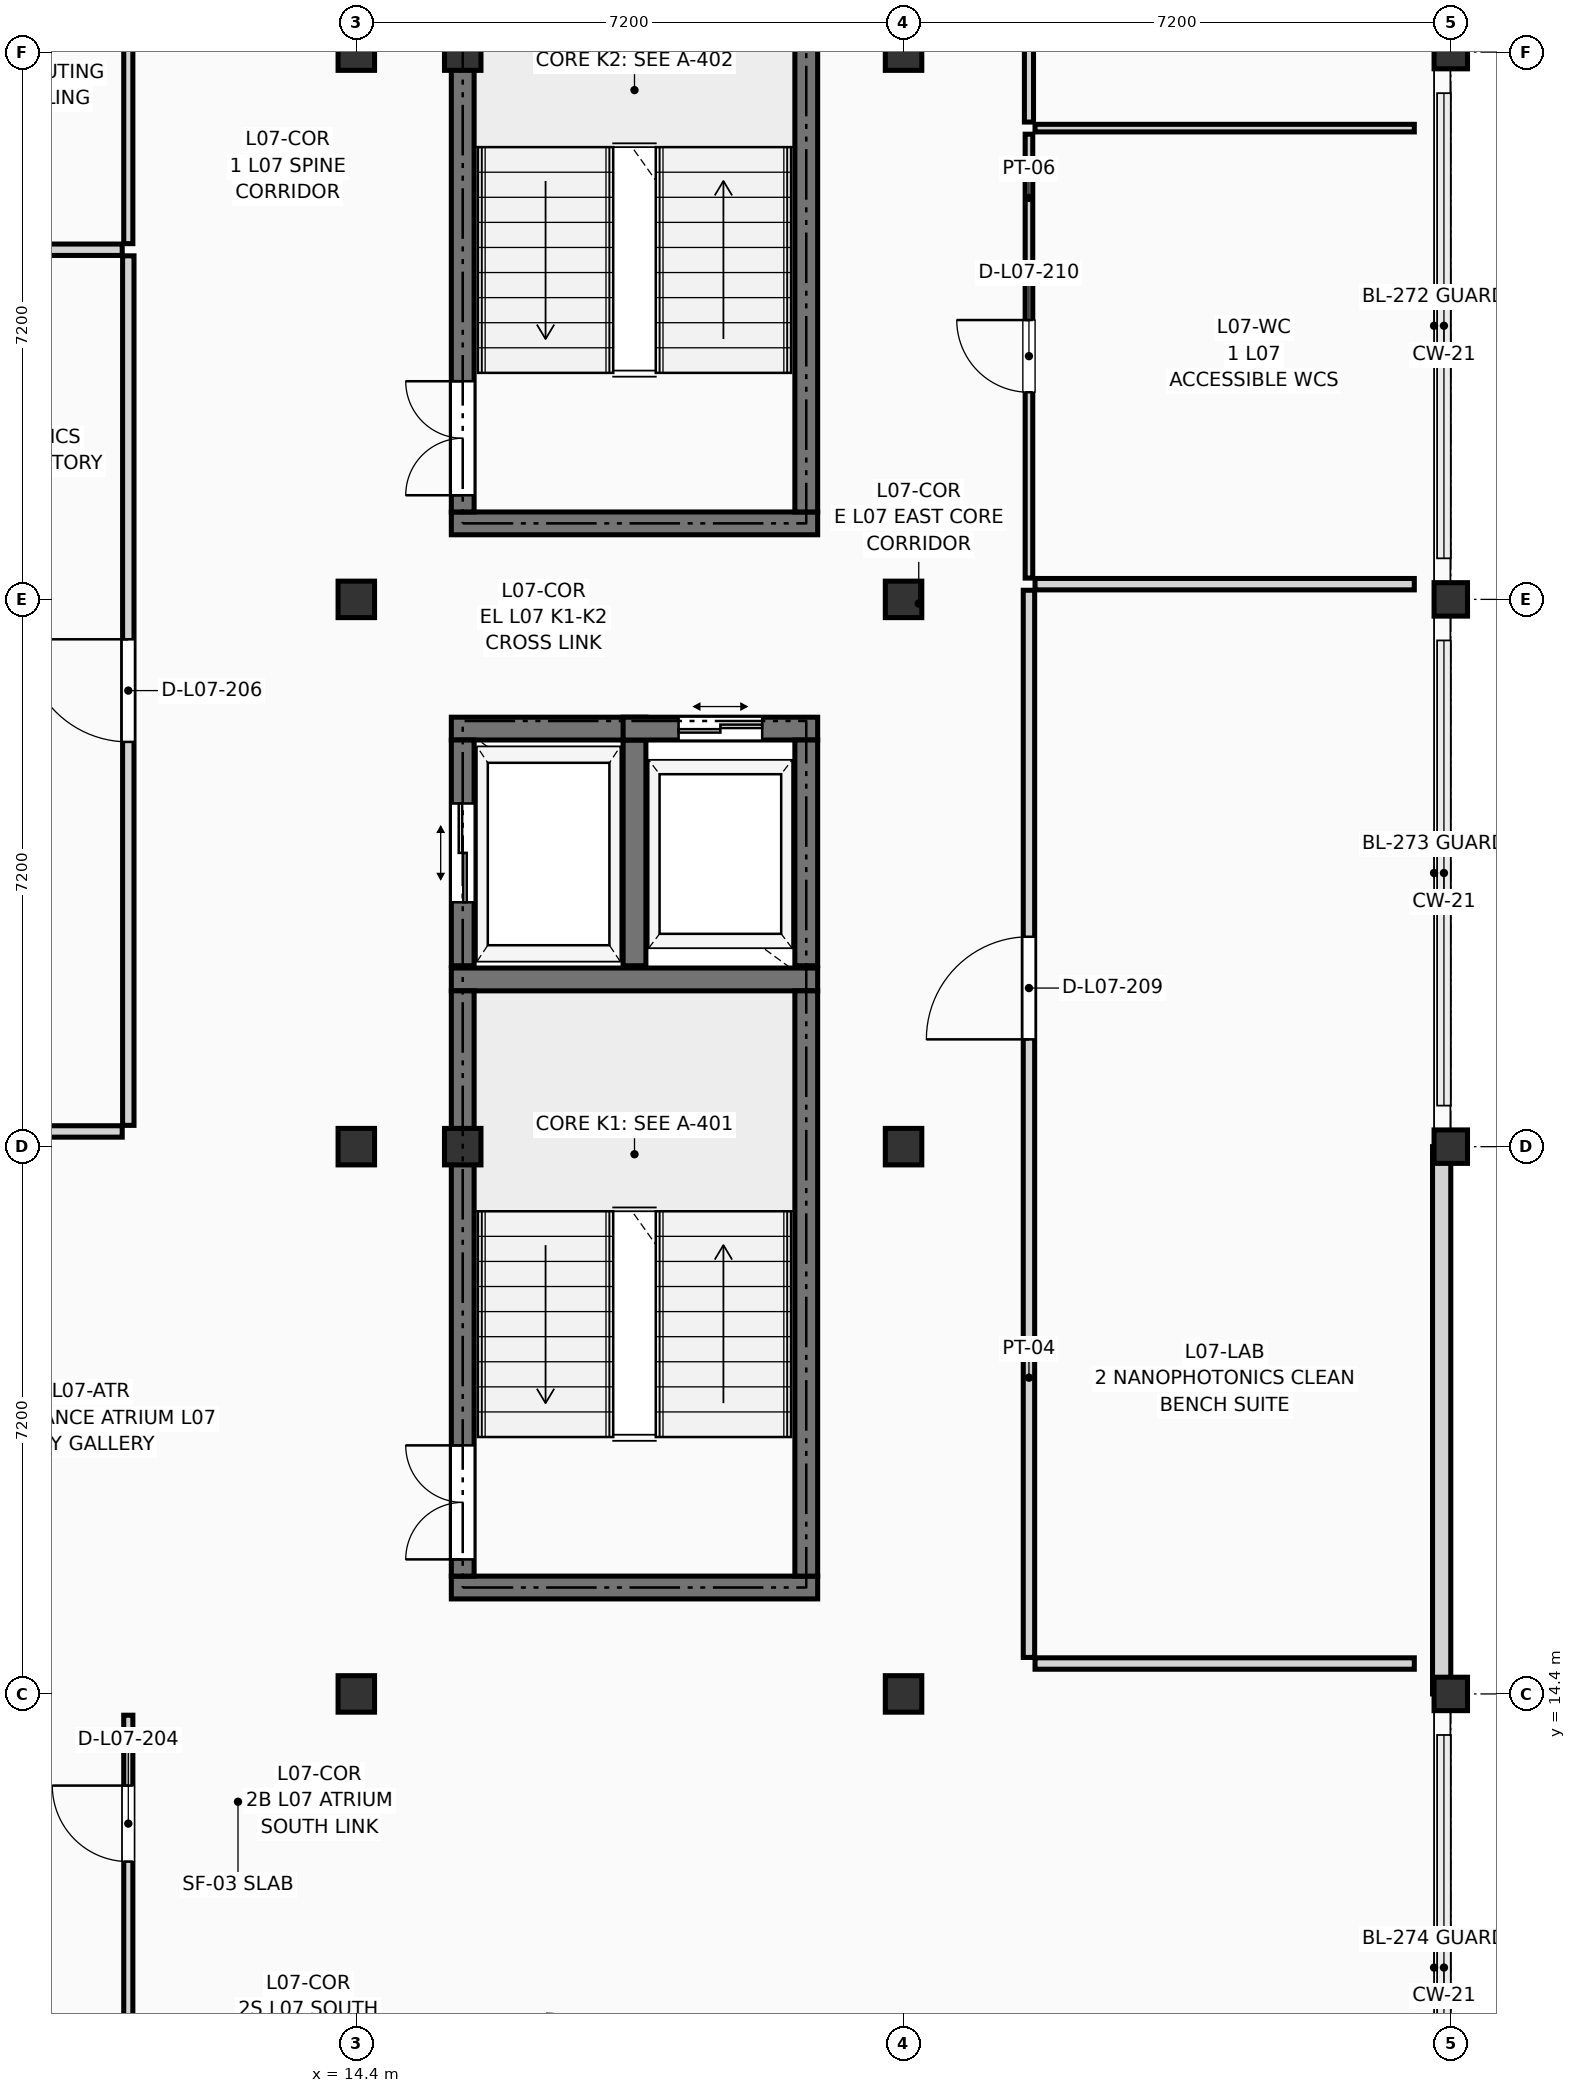
"""IFC4 building model, lengths in metres.
Left out: names, types, materials, properties, quantities, classifications, styles, units other than length and angle.
Written with IfcOpenShell. Run it as: python <this file> out.ifc"""

import sys

from ifc_helpers import new_model, si_unit, direction, frame, frame_2d, origin, origin_2d, place, context, subcontext, project, spatial, rectangle, extrude, element, fill, save


model = new_model("IFC4")
c1 = context("Model", 3, precision=1e-05, world=origin(), true_north=direction((0.0, 1.0)))
c2 = subcontext(c1, "Body", "Model", "MODEL_VIEW")
j1 = project(units=[si_unit("LENGTHUNIT", "METRE"), si_unit("PLANEANGLEUNIT", "RADIAN")], contexts=[c1])
p1 = place(None, origin())
s1 = spatial("IfcSite", under=j1, at=p1, CompositionType="ELEMENT")
p2 = place(p1, origin())
s2 = spatial("IfcBuilding", under=s1, at=p2, CompositionType="ELEMENT")
p3 = place(p2, frame((0.0, 0.0, 26.25)))
s3 = spatial("IfcBuildingStorey", under=s2, at=p3, CompositionType="ELEMENT", Elevation=26.25)
for number, where, z_axis, x_axis in (
    (1, (14.4, 14.4, 0.0), (0.0, 0.0, 1.0), (1.0, 0.0, 0.0)),
    (2, (14.4, 21.6, 0.0), (0.0, 0.0, 1.0), (1.0, 0.0, 0.0)),
    (3, (14.4, 28.8, 0.0), (0.0, 0.0, 1.0), (1.0, 0.0, 0.0)),
    (4, (14.4, 36.0, 0.0), (0.0, 0.0, 1.0), (1.0, 0.0, 0.0)),
    (5, (15.8, 21.6, 0.0), (0.0, 0.0, 1.0), (1.0, 0.0, 0.0)),
    (6, (15.8, 36.0, 0.0), (0.0, 0.0, 1.0), (1.0, 0.0, 0.0)),
    (7, (21.6, 14.4, 0.0), (0.0, 0.0, 1.0), (1.0, 0.0, 0.0)),
    (8, (21.6, 21.6, 0.0), (0.0, 0.0, 1.0), (1.0, 0.0, 0.0)),
    (9, (21.6, 28.8, 0.0), (0.0, 0.0, 1.0), (1.0, 0.0, 0.0)),
    (10, (21.6, 36.0, 0.0), (0.0, 0.0, 1.0), (1.0, 0.0, 0.0)),
):
    element("IfcColumn", number, at=place(p3, frame(where, z_axis=z_axis, x_axis=x_axis)), inside=s3, PredefinedType="COLUMN", context=c2, shape_type="SweptSolid", body=[
        extrude(rectangle(XDim=0.48, YDim=0.48, at=origin_2d()), origin(), (0.0, 0.0, 1.0), 3.45),
    ])
for number, where, z_axis, x_axis in (
    (11, (28.8, 14.4, 0.0), (0.0, 0.0, 1.0), (1.0, 0.0, 0.0)),
    (12, (28.8, 21.6, 0.0), (0.0, 0.0, 1.0), (1.0, 0.0, 0.0)),
    (13, (28.8, 28.8, 0.0), (0.0, 0.0, 1.0), (1.0, 0.0, 0.0)),
    (14, (28.8, 36.0, 0.0), (0.0, 0.0, 1.0), (1.0, 0.0, 0.0)),
):
    element("IfcColumn", number, at=place(p3, frame(where, z_axis=z_axis, x_axis=x_axis)), inside=s3, PredefinedType="COLUMN", context=c2, shape_type="SweptSolid", body=[
        extrude(rectangle(XDim=0.44, YDim=0.44, at=origin_2d()), origin(), (0.0, 0.0, 1.0), 3.45),
    ])
p4 = place(p3, frame((28.68, 14.4, 0.0), z_axis=(0.0, 0.0, 1.0), x_axis=(0.0, 1.0, 0.0)))
e15 = element("IfcWall", 15, at=p4, inside=s3, PredefinedType="SOLIDWALL", context=c2, shape_type="SweptSolid", body=[
    extrude(rectangle(XDim=7.2, YDim=0.24, at=frame_2d((3.6, 0.0))), origin(), (0.0, 0.0, 1.0), 2.69),
])
for number, where, z_axis, x_axis in (
    (16, (15.65, 15.8, 0.0), (0.0, 0.0, 1.0), (1.0, 0.0, 0.0)),
    (17, (15.65, 23.8, 0.0), (0.0, 0.0, 1.0), (1.0, 0.0, 0.0)),
):
    element("IfcWall", number, at=place(p3, frame(where, z_axis=z_axis, x_axis=x_axis)), inside=s3, PredefinedType="SHEAR", context=c2, shape_type="SweptSolid", body=[
        extrude(rectangle(XDim=4.82, YDim=0.3, at=frame_2d((2.41, 0.0))), origin(), (0.0, 0.0, 1.0), 3.24),
    ])
p5 = place(p3, frame((15.8, 15.95, 0.0), z_axis=(0.0, 0.0, 1.0), x_axis=(0.0, 1.0, 0.0)))
e18 = element("IfcWall", 18, at=p5, inside=s3, PredefinedType="SHEAR", context=c2, shape_type="SweptSolid", body=[
    extrude(rectangle(XDim=7.7, YDim=0.3, at=frame_2d((3.85, 0.0))), origin(), (0.0, 0.0, 1.0), 3.24),
])
p6 = place(p5, frame((0.22, 0.0, 0.0)))
e19 = element("IfcOpeningElement", 19, at=p6, cuts=e18, PredefinedType="OPENING", context=c2, shape_type="SweptSolid", body=[
    extrude(rectangle(XDim=1.5, YDim=2.2, at=frame_2d((0.75, 1.1))), frame((0.0, 0.162, 0.0), z_axis=(0.0, -1.0, 0.0), x_axis=(1.0, 0.0, 0.0)), (0.0, 0.0, 1.0), 0.324),
])
p7 = place(p3, frame((20.32, 15.95, 0.0), z_axis=(0.0, 0.0, 1.0), x_axis=(0.0, 1.0, 0.0)))
e20 = element("IfcWall", 20, at=p7, inside=s3, PredefinedType="SHEAR", context=c2, shape_type="SweptSolid", body=[
    extrude(rectangle(XDim=7.7, YDim=0.3, at=frame_2d((3.85, 0.0))), origin(), (0.0, 0.0, 1.0), 3.24),
])
p8 = place(p3, frame((15.65, 29.8, 0.0), z_axis=(0.0, 0.0, 1.0), x_axis=(1.0, 0.0, 0.0)))
e21 = element("IfcWall", 21, at=p8, inside=s3, PredefinedType="SHEAR", context=c2, shape_type="SweptSolid", body=[
    extrude(rectangle(XDim=4.82, YDim=0.3, at=frame_2d((2.41, 0.0))), origin(), (0.0, 0.0, 1.0), 3.24),
])
p9 = place(p3, frame((15.8, 29.95, 0.0), z_axis=(0.0, 0.0, 1.0), x_axis=(0.0, 1.0, 0.0)))
e22 = element("IfcWall", 22, at=p9, inside=s3, PredefinedType="SHEAR", context=c2, shape_type="SweptSolid", body=[
    extrude(rectangle(XDim=7.7, YDim=0.3, at=frame_2d((3.85, 0.0))), origin(), (0.0, 0.0, 1.0), 3.24),
])
p10 = place(p9, frame((0.22, 0.0, 0.0)))
e23 = element("IfcOpeningElement", 23, at=p10, cuts=e22, PredefinedType="OPENING", context=c2, shape_type="SweptSolid", body=[
    extrude(rectangle(XDim=1.5, YDim=2.2, at=frame_2d((0.75, 1.1))), frame((0.0, 0.162, 0.0), z_axis=(0.0, -1.0, 0.0), x_axis=(1.0, 0.0, 0.0)), (0.0, 0.0, 1.0), 0.324),
])
p11 = place(p3, frame((20.32, 29.95, 0.0), z_axis=(0.0, 0.0, 1.0), x_axis=(0.0, 1.0, 0.0)))
e24 = element("IfcWall", 24, at=p11, inside=s3, PredefinedType="SHEAR", context=c2, shape_type="SweptSolid", body=[
    extrude(rectangle(XDim=7.7, YDim=0.3, at=frame_2d((3.85, 0.0))), origin(), (0.0, 0.0, 1.0), 3.24),
])
p12 = place(p3, frame((15.65, 27.1, 0.0), z_axis=(0.0, 0.0, 1.0), x_axis=(1.0, 0.0, 0.0)))
e25 = element("IfcWall", 25, at=p12, inside=s3, PredefinedType="SHEAR", context=c2, shape_type="SweptSolid", body=[
    extrude(rectangle(XDim=2.56, YDim=0.3, at=frame_2d((1.28, 0.0))), origin(), (0.0, 0.0, 1.0), 3.24),
])
p13 = place(p3, frame((15.8, 23.98, 0.0), z_axis=(0.0, 0.0, 1.0), x_axis=(0.0, 1.0, 0.0)))
e26 = element("IfcWall", 26, at=p13, inside=s3, PredefinedType="SHEAR", context=c2, shape_type="SweptSolid", body=[
    extrude(rectangle(XDim=2.97, YDim=0.3, at=frame_2d((1.485, 0.0))), origin(), (0.0, 0.0, 1.0), 3.24),
])
p14 = place(p13, frame((0.835, 0.0, 0.0)))
e27 = element("IfcOpeningElement", 27, at=p14, cuts=e26, PredefinedType="OPENING", context=c2, shape_type="SweptSolid", body=[
    extrude(rectangle(XDim=1.3, YDim=2.25, at=frame_2d((0.65, 1.125))), frame((0.0, 0.162, 0.0), z_axis=(0.0, -1.0, 0.0), x_axis=(1.0, 0.0, 0.0)), (0.0, 0.0, 1.0), 0.324),
])
p15 = place(p3, frame((18.06, 23.98, 0.0), z_axis=(0.0, 0.0, 1.0), x_axis=(0.0, 1.0, 0.0)))
e28 = element("IfcWall", 28, at=p15, inside=s3, PredefinedType="SHEAR", context=c2, shape_type="SweptSolid", body=[
    extrude(rectangle(XDim=2.97, YDim=0.3, at=frame_2d((1.485, 0.0))), origin(), (0.0, 0.0, 1.0), 3.24),
])
p16 = place(p3, frame((17.91, 27.1, 0.0), z_axis=(0.0, 0.0, 1.0), x_axis=(1.0, 0.0, 0.0)))
e29 = element("IfcWall", 29, at=p16, inside=s3, PredefinedType="SHEAR", context=c2, shape_type="SweptSolid", body=[
    extrude(rectangle(XDim=2.56, YDim=0.3, at=frame_2d((1.28, 0.0))), origin(), (0.0, 0.0, 1.0), 3.24),
])
p17 = place(p16, frame((0.73, 0.0, 0.0)))
e30 = element("IfcOpeningElement", 30, at=p17, cuts=e29, PredefinedType="OPENING", context=c2, shape_type="SweptSolid", body=[
    extrude(rectangle(XDim=1.1, YDim=2.2, at=frame_2d((0.55, 1.1))), frame((0.0, 0.162, 0.0), z_axis=(0.0, -1.0, 0.0), x_axis=(1.0, 0.0, 0.0)), (0.0, 0.0, 1.0), 0.324),
])
p18 = place(p3, frame((20.32, 23.98, 0.0), z_axis=(0.0, 0.0, 1.0), x_axis=(0.0, 1.0, 0.0)))
e31 = element("IfcWall", 31, at=p18, inside=s3, PredefinedType="SHEAR", context=c2, shape_type="SweptSolid", body=[
    extrude(rectangle(XDim=2.97, YDim=0.3, at=frame_2d((1.485, 0.0))), origin(), (0.0, 0.0, 1.0), 3.24),
])
p19 = place(p3, frame((11.4, 7.53, 0.0), z_axis=(0.0, 0.0, 1.0), x_axis=(0.0, 1.0, 0.0)))
e32 = element("IfcWall", 32, at=p19, inside=s3, PredefinedType="PARTITIONING", context=c2, shape_type="SweptSolid", body=[
    extrude(rectangle(XDim=6.59, YDim=0.12, at=frame_2d((3.295, 0.0))), origin(), (0.0, 0.0, 1.0), 3.225),
])
p20 = place(p19, frame((4.664, 0.0, 0.0)))
e33 = element("IfcOpeningElement", 33, at=p20, cuts=e32, PredefinedType="OPENING", context=c2, shape_type="SweptSolid", body=[
    extrude(rectangle(XDim=1.0, YDim=2.15, at=frame_2d((0.5, 1.075))), frame((0.0, 0.072, 0.0), z_axis=(0.0, -1.0, 0.0), x_axis=(1.0, 0.0, 0.0)), (0.0, 0.0, 1.0), 0.144),
])
p21 = place(p3, frame((7.58, 21.8, 0.0), z_axis=(0.0, 0.0, 1.0), x_axis=(1.0, 0.0, 0.0)))
e34 = element("IfcWall", 34, at=p21, inside=s3, PredefinedType="PARTITIONING", context=c2, shape_type="SweptSolid", body=[
    extrude(rectangle(XDim=3.74, YDim=0.15, at=frame_2d((1.87, 0.0))), origin(), (0.0, 0.0, 1.0), 2.541),
])
p22 = place(p3, frame((11.4, 21.88, 0.0), z_axis=(0.0, 0.0, 1.0), x_axis=(0.0, 1.0, 0.0)))
e35 = element("IfcWall", 35, at=p22, inside=s3, PredefinedType="PARTITIONING", context=c2, shape_type="SweptSolid", body=[
    extrude(rectangle(XDim=11.44, YDim=0.15, at=frame_2d((5.72, 0.0))), origin(), (0.0, 0.0, 1.0), 3.225),
])
p23 = place(p22, frame((5.045, 0.0, 0.0)))
e36 = element("IfcOpeningElement", 36, at=p23, cuts=e35, PredefinedType="OPENING", context=c2, shape_type="SweptSolid", body=[
    extrude(rectangle(XDim=1.35, YDim=2.2, at=frame_2d((0.675, 1.1))), frame((0.0, 0.087, 0.0), z_axis=(0.0, -1.0, 0.0), x_axis=(1.0, 0.0, 0.0)), (0.0, 0.0, 1.0), 0.174),
])
p24 = place(p3, frame((7.58, 33.4, 0.0), z_axis=(0.0, 0.0, 1.0), x_axis=(1.0, 0.0, 0.0)))
e37 = element("IfcWall", 37, at=p24, inside=s3, PredefinedType="PARTITIONING", context=c2, shape_type="SweptSolid", body=[
    extrude(rectangle(XDim=3.74, YDim=0.15, at=frame_2d((1.87, 0.0))), origin(), (0.0, 0.0, 1.0), 3.225),
])
p25 = place(p3, frame((11.4, 33.48, 0.0), z_axis=(0.0, 0.0, 1.0), x_axis=(0.0, 1.0, 0.0)))
e38 = element("IfcWall", 38, at=p25, inside=s3, PredefinedType="PARTITIONING", context=c2, shape_type="SweptSolid", body=[
    extrude(rectangle(XDim=11.24, YDim=0.12, at=frame_2d((5.62, 0.0))), origin(), (0.0, 0.0, 1.0), 3.225),
])
p26 = place(p25, frame((4.96, 0.0, 0.0)))
e39 = element("IfcOpeningElement", 39, at=p26, cuts=e38, PredefinedType="OPENING", context=c2, shape_type="SweptSolid", body=[
    extrude(rectangle(XDim=1.32, YDim=2.2, at=frame_2d((0.66, 1.1))), frame((0.0, 0.072, 0.0), z_axis=(0.0, -1.0, 0.0), x_axis=(1.0, 0.0, 0.0)), (0.0, 0.0, 1.0), 0.144),
])
p27 = place(p3, frame((23.25, 14.88, 0.0), z_axis=(0.0, 0.0, 1.0), x_axis=(0.0, 1.0, 0.0)))
e40 = element("IfcWall", 40, at=p27, inside=s3, PredefinedType="PARTITIONING", context=c2, shape_type="SweptSolid", body=[
    extrude(rectangle(XDim=14.04, YDim=0.15, at=frame_2d((7.02, 0.0))), origin(), (0.0, 0.0, 1.0), 3.225),
])
p28 = place(p27, frame((8.132, 0.0, 0.0)))
e41 = element("IfcOpeningElement", 41, at=p28, cuts=e40, PredefinedType="OPENING", context=c2, shape_type="SweptSolid", body=[
    extrude(rectangle(XDim=1.35, YDim=2.2, at=frame_2d((0.675, 1.1))), frame((0.0, 0.087, 0.0), z_axis=(0.0, -1.0, 0.0), x_axis=(1.0, 0.0, 0.0)), (0.0, 0.0, 1.0), 0.174),
])
p29 = place(p3, frame((23.33, 14.8, 0.0), z_axis=(0.0, 0.0, 1.0), x_axis=(1.0, 0.0, 0.0)))
e42 = element("IfcWall", 42, at=p29, inside=s3, PredefinedType="PARTITIONING", context=c2, shape_type="SweptSolid", body=[
    extrude(rectangle(XDim=4.99, YDim=0.15, at=frame_2d((2.495, 0.0))), origin(), (0.0, 0.0, 1.0), 3.225),
])
p30 = place(p3, frame((23.33, 29.0, 0.0), z_axis=(0.0, 0.0, 1.0), x_axis=(1.0, 0.0, 0.0)))
e43 = element("IfcWall", 43, at=p30, inside=s3, PredefinedType="PARTITIONING", context=c2, shape_type="SweptSolid", body=[
    extrude(rectangle(XDim=4.99, YDim=0.15, at=frame_2d((2.495, 0.0))), origin(), (0.0, 0.0, 1.0), 2.541),
])
p31 = place(p3, frame((23.25, 29.08, 0.0), z_axis=(0.0, 0.0, 1.0), x_axis=(0.0, 1.0, 0.0)))
e44 = element("IfcWall", 44, at=p31, inside=s3, PredefinedType="PARTITIONING", context=c2, shape_type="SweptSolid", body=[
    extrude(rectangle(XDim=5.84, YDim=0.1, at=frame_2d((2.92, 0.0))), origin(), (0.0, 0.0, 1.0), 3.225),
])
p32 = place(p31, frame((2.445, 0.0, 0.0)))
e45 = element("IfcOpeningElement", 45, at=p32, cuts=e44, PredefinedType="OPENING", context=c2, shape_type="SweptSolid", body=[
    extrude(rectangle(XDim=0.95, YDim=2.1, at=frame_2d((0.475, 1.05))), frame((0.0, 0.062, 0.0), z_axis=(0.0, -1.0, 0.0), x_axis=(1.0, 0.0, 0.0)), (0.0, 0.0, 1.0), 0.124),
])
p33 = place(p3, frame((23.33, 35.0, 0.0), z_axis=(0.0, 0.0, 1.0), x_axis=(1.0, 0.0, 0.0)))
e46 = element("IfcWall", 46, at=p33, inside=s3, PredefinedType="PARTITIONING", context=c2, shape_type="SweptSolid", body=[
    extrude(rectangle(XDim=4.99, YDim=0.1, at=frame_2d((2.495, 0.0))), origin(), (0.0, 0.0, 1.0), 3.225),
])
p34 = place(p3, frame((23.25, 35.08, 0.0), z_axis=(0.0, 0.0, 1.0), x_axis=(0.0, 1.0, 0.0)))
e47 = element("IfcWall", 47, at=p34, inside=s3, PredefinedType="PARTITIONING", context=c2, shape_type="SweptSolid", body=[
    extrude(rectangle(XDim=9.84, YDim=0.12, at=frame_2d((4.92, 0.0))), origin(), (0.0, 0.0, 1.0), 3.225),
])
p35 = place(p34, frame((4.26, 0.0, 0.0)))
e48 = element("IfcOpeningElement", 48, at=p35, cuts=e47, PredefinedType="OPENING", context=c2, shape_type="SweptSolid", body=[
    extrude(rectangle(XDim=1.32, YDim=2.2, at=frame_2d((0.66, 1.1))), frame((0.0, 0.072, 0.0), z_axis=(0.0, -1.0, 0.0), x_axis=(1.0, 0.0, 0.0)), (0.0, 0.0, 1.0), 0.144),
])
p36 = place(p6, origin())
e49 = element("IfcDoor", 49, at=p36, inside=s3, OperationType="DOUBLE_DOOR_SINGLE_SWING", PredefinedType="DOOR", context=c2, shape_type="SweptSolid", body=[
    extrude(rectangle(XDim=1.5, YDim=2.2, at=frame_2d((0.75, 1.1))), frame((0.0, 0.025, 0.0), z_axis=(0.0, -1.0, 0.0), x_axis=(1.0, 0.0, 0.0)), (0.0, 0.0, 1.0), 0.05),
])
fill(e19, e49)
p37 = place(p10, origin())
e50 = element("IfcDoor", 50, at=p37, inside=s3, OperationType="DOUBLE_DOOR_SINGLE_SWING", PredefinedType="DOOR", context=c2, shape_type="SweptSolid", body=[
    extrude(rectangle(XDim=1.5, YDim=2.2, at=frame_2d((0.75, 1.1))), frame((0.0, 0.025, 0.0), z_axis=(0.0, -1.0, 0.0), x_axis=(1.0, 0.0, 0.0)), (0.0, 0.0, 1.0), 0.05),
])
fill(e23, e50)
p38 = place(p14, origin())
e51 = element("IfcDoor", 51, at=p38, inside=s3, OperationType="DOUBLE_DOOR_SLIDING", PredefinedType="DOOR", context=c2, shape_type="SweptSolid", body=[
    extrude(rectangle(XDim=1.3, YDim=2.25, at=frame_2d((0.65, 1.125))), frame((0.0, 0.025, 0.0), z_axis=(0.0, -1.0, 0.0), x_axis=(1.0, 0.0, 0.0)), (0.0, 0.0, 1.0), 0.05),
])
fill(e27, e51)
p39 = place(p17, origin())
e52 = element("IfcDoor", 52, at=p39, inside=s3, OperationType="DOUBLE_DOOR_SLIDING", PredefinedType="DOOR", context=c2, shape_type="SweptSolid", body=[
    extrude(rectangle(XDim=1.1, YDim=2.2, at=frame_2d((0.55, 1.1))), frame((0.0, 0.025, 0.0), z_axis=(0.0, -1.0, 0.0), x_axis=(1.0, 0.0, 0.0)), (0.0, 0.0, 1.0), 0.05),
])
fill(e30, e52)
p40 = place(p20, origin())
e53 = element("IfcDoor", 53, at=p40, inside=s3, OperationType="SINGLE_SWING_RIGHT", PredefinedType="DOOR", context=c2, shape_type="SweptSolid", body=[
    extrude(rectangle(XDim=1.0, YDim=2.15, at=frame_2d((0.5, 1.075))), frame((0.0, 0.025, 0.0), z_axis=(0.0, -1.0, 0.0), x_axis=(1.0, 0.0, 0.0)), (0.0, 0.0, 1.0), 0.05),
])
fill(e33, e53)
p41 = place(p23, origin())
e54 = element("IfcDoor", 54, at=p41, inside=s3, OperationType="SINGLE_SWING_RIGHT", PredefinedType="DOOR", context=c2, shape_type="SweptSolid", body=[
    extrude(rectangle(XDim=1.35, YDim=2.2, at=frame_2d((0.675, 1.1))), frame((0.0, 0.025, 0.0), z_axis=(0.0, -1.0, 0.0), x_axis=(1.0, 0.0, 0.0)), (0.0, 0.0, 1.0), 0.05),
])
fill(e36, e54)
p42 = place(p28, origin())
e55 = element("IfcDoor", 55, at=p42, inside=s3, OperationType="SINGLE_SWING_LEFT", PredefinedType="DOOR", context=c2, shape_type="SweptSolid", body=[
    extrude(rectangle(XDim=1.35, YDim=2.2, at=frame_2d((0.675, 1.1))), frame((0.0, 0.025, 0.0), z_axis=(0.0, -1.0, 0.0), x_axis=(1.0, 0.0, 0.0)), (0.0, 0.0, 1.0), 0.05),
])
fill(e41, e55)
p43 = place(p32, origin())
e56 = element("IfcDoor", 56, at=p43, inside=s3, OperationType="SINGLE_SWING_RIGHT", PredefinedType="DOOR", context=c2, shape_type="SweptSolid", body=[
    extrude(rectangle(XDim=0.95, YDim=2.1, at=frame_2d((0.475, 1.05))), frame((0.0, 0.025, 0.0), z_axis=(0.0, -1.0, 0.0), x_axis=(1.0, 0.0, 0.0)), (0.0, 0.0, 1.0), 0.05),
])
fill(e45, e56)
save(model, sys.argv[1])
